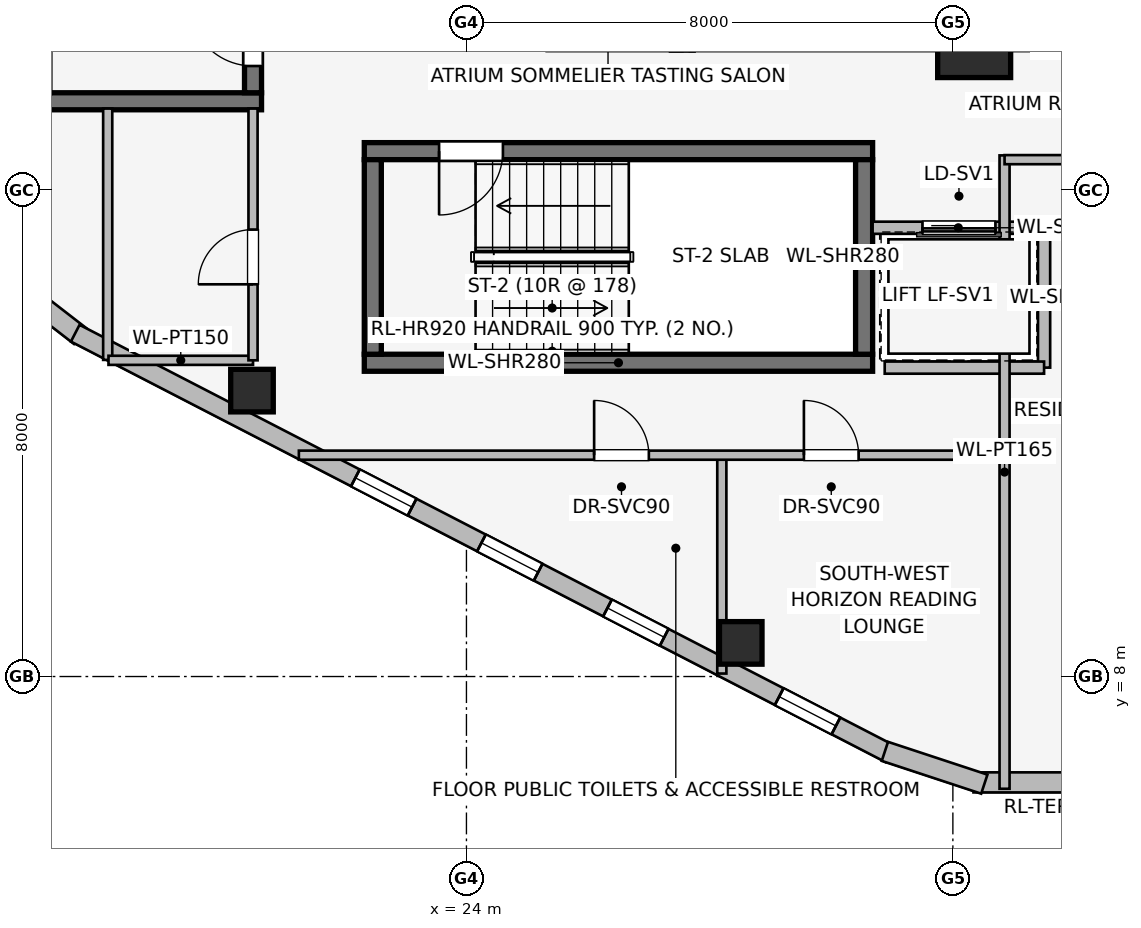
"""IFC4 building model, lengths in metres.
Left out: names, types, materials, properties, quantities, classifications, styles, units other than length and angle.
Written with IfcOpenShell. Run it as: python <this file> out.ifc"""

import sys

from ifc_helpers import new_model, si_unit, direction, frame, frame_2d, origin, origin_2d, place, context, subcontext, project, spatial, rectangle, extrude, element, fill, save


model = new_model("IFC4")
c1 = context("Model", 3, precision=1e-05, world=origin(), true_north=direction((0.0, 1.0)))
c2 = subcontext(c1, "Body", "Model", "MODEL_VIEW")
j1 = project(units=[si_unit("LENGTHUNIT", "METRE"), si_unit("PLANEANGLEUNIT", "RADIAN")], contexts=[c1])
p1 = place(None, origin())
s1 = spatial("IfcSite", under=j1, at=p1, CompositionType="ELEMENT")
p2 = place(p1, origin())
s2 = spatial("IfcBuilding", under=s1, at=p2, CompositionType="ELEMENT")
p3 = place(p2, frame((0.0, 0.0, 234.8)))
s3 = spatial("IfcBuildingStorey", under=s2, at=p3, CompositionType="ELEMENT", Elevation=234.8)
p4 = place(p3, frame((16.87, 17.46, 0.0), z_axis=(0.0, 0.0, 1.0), x_axis=(1.0, 0.0, 0.0)))
e1 = element("IfcWall", 1, at=p4, inside=s3, PredefinedType="SHEAR", context=c2, shape_type="SweptSolid", body=[
    extrude(rectangle(XDim=3.76, YDim=0.28, at=frame_2d((1.88, 0.0))), origin(), (0.0, 0.0, 1.0), 3.55),
])
p5 = place(p3, frame((20.49, 17.6, 0.0), z_axis=(0.0, 0.0, 1.0), x_axis=(0.0, 1.0, 0.0)))
e2 = element("IfcWall", 2, at=p5, inside=s3, PredefinedType="SHEAR", context=c2, shape_type="SweptSolid", body=[
    extrude(rectangle(XDim=7.8, YDim=0.28, at=frame_2d((3.9, 0.0))), origin(), (0.0, 0.0, 1.0), 3.55),
])
p6 = place(p5, frame((0.44, 0.0, 0.0)))
e3 = element("IfcOpeningElement", 3, at=p6, cuts=e2, PredefinedType="OPENING", context=c2, shape_type="SweptSolid", body=[
    extrude(rectangle(XDim=1.05, YDim=2.0, at=frame_2d((0.525, 1.0))), frame((0.0, 0.15, 0.0), z_axis=(0.0, -1.0, 0.0), x_axis=(1.0, 0.0, 0.0)), (0.0, 0.0, 1.0), 0.3),
])
p7 = place(p3, frame((22.32, 13.16, 0.0), z_axis=(0.0, 0.0, 1.0), x_axis=(1.0, 0.0, 0.0)))
e4 = element("IfcWall", 4, at=p7, inside=s3, PredefinedType="SHEAR", context=c2, shape_type="SweptSolid", body=[
    extrude(rectangle(XDim=8.36, YDim=0.28, at=frame_2d((4.18, 0.0))), origin(), (0.0, 0.0, 1.0), 3.55),
])
p8 = place(p3, frame((30.68, 16.64, 0.0), z_axis=(0.0, 0.0, 1.0), x_axis=(-1.0, 0.0, 0.0)))
e5 = element("IfcWall", 5, at=p8, inside=s3, PredefinedType="SHEAR", context=c2, shape_type="SweptSolid", body=[
    extrude(rectangle(XDim=8.36, YDim=0.28, at=frame_2d((4.18, 0.0))), origin(), (0.0, 0.0, 1.0), 3.55),
])
p9 = place(p8, frame((6.08, 0.0, 0.0)))
e6 = element("IfcOpeningElement", 6, at=p9, cuts=e5, PredefinedType="OPENING", context=c2, shape_type="SweptSolid", body=[
    extrude(rectangle(XDim=1.05, YDim=2.0, at=frame_2d((0.525, 1.0))), frame((0.0, 0.15, 0.0), z_axis=(0.0, -1.0, 0.0), x_axis=(1.0, 0.0, 0.0)), (0.0, 0.0, 1.0), 0.3),
])
for number, where, z_axis, x_axis in (
    (7, (22.46, 16.5, 0.0), (0.0, 0.0, 1.0), (0.0, -1.0, 0.0)),
    (8, (30.54, 13.3, 0.0), (0.0, 0.0, 1.0), (0.0, 1.0, 0.0)),
):
    element("IfcWall", number, at=place(p3, frame(where, z_axis=z_axis, x_axis=x_axis)), inside=s3, PredefinedType="SHEAR", context=c2, shape_type="SweptSolid", body=[
        extrude(rectangle(XDim=3.2, YDim=0.28, at=frame_2d((1.6, 0.0))), origin(), (0.0, 0.0, 1.0), 3.55),
    ])
p10 = place(p3, frame((32.35, 18.45, 0.0), z_axis=(0.0, 0.0, 1.0), x_axis=(1.0, 0.0, 0.0)))
e9 = element("IfcColumn", 9, at=p10, inside=s3, PredefinedType="COLUMN", context=c2, shape_type="SweptSolid", body=[
    extrude(rectangle(XDim=1.2, YDim=1.2, at=origin_2d()), origin(), (0.0, 0.0, 1.0), 3.55),
])
for number, where, z_axis, x_axis in (
    (10, (20.473, 12.702, 0.0), (0.0, 0.0, 1.0), (1.0, 0.0, 0.0)),
    (11, (28.511, 8.553, 0.0), (0.0, 0.0, 1.0), (1.0, 0.0, 0.0)),
):
    element("IfcColumn", number, at=place(p3, frame(where, z_axis=z_axis, x_axis=x_axis)), inside=s3, PredefinedType="COLUMN", context=c2, shape_type="SweptSolid", body=[
        extrude(rectangle(XDim=0.7, YDim=0.7, at=origin_2d()), origin(), (0.0, 0.0, 1.0), 3.55),
    ])
p11 = place(p3, frame((17.647, 13.599, 0.0), z_axis=(0.0, 0.0, 1.0), x_axis=(-0.790691856293, 0.61221433207, 0.0)))
e12 = element("IfcWall", 12, at=p11, inside=s3, PredefinedType="STANDARD", context=c2, shape_type="SweptSolid", body=[
    extrude(rectangle(XDim=1.676, YDim=0.33, at=frame_2d((0.838, 0.0))), origin(), (0.0, 0.0, 1.0), 3.26),
])
p12 = place(p3, frame((30.963, 6.73, 0.0), z_axis=(0.0, 0.0, 1.0), x_axis=(-0.888581481622, 0.458718814218, 0.0)))
e13 = element("IfcWall", 13, at=p12, inside=s3, PredefinedType="STANDARD", context=c2, shape_type="SweptSolid", body=[
    extrude(rectangle(XDim=15.077, YDim=0.31, at=frame_2d((7.539, 0.0))), origin(), (0.0, 0.0, 1.0), 3.26),
])
p13 = place(p12, frame((0.998, 0.0, 0.75)))
e14 = element("IfcOpeningElement", 14, at=p13, cuts=e13, PredefinedType="OPENING", context=c2, shape_type="SweptSolid", body=[
    extrude(rectangle(XDim=1.05, YDim=1.4, at=frame_2d((0.525, 0.7))), frame((0.0, 0.165, 0.0), z_axis=(0.0, -1.0, 0.0), x_axis=(1.0, 0.0, 0.0)), (0.0, 0.0, 1.0), 0.33),
])
p14 = place(p12, frame((4.176, 0.0, 0.75)))
e15 = element("IfcOpeningElement", 15, at=p14, cuts=e13, PredefinedType="OPENING", context=c2, shape_type="SweptSolid", body=[
    extrude(rectangle(XDim=1.05, YDim=1.4, at=frame_2d((0.525, 0.7))), frame((0.0, 0.165, 0.0), z_axis=(0.0, -1.0, 0.0), x_axis=(1.0, 0.0, 0.0)), (0.0, 0.0, 1.0), 0.33),
])
p15 = place(p12, frame((6.509, 0.0, 0.75)))
e16 = element("IfcOpeningElement", 16, at=p15, cuts=e13, PredefinedType="OPENING", context=c2, shape_type="SweptSolid", body=[
    extrude(rectangle(XDim=1.05, YDim=1.4, at=frame_2d((0.525, 0.7))), frame((0.0, 0.165, 0.0), z_axis=(0.0, -1.0, 0.0), x_axis=(1.0, 0.0, 0.0)), (0.0, 0.0, 1.0), 0.33),
])
p16 = place(p12, frame((8.842, 0.0, 0.75)))
e17 = element("IfcOpeningElement", 17, at=p16, cuts=e13, PredefinedType="OPENING", context=c2, shape_type="SweptSolid", body=[
    extrude(rectangle(XDim=1.05, YDim=1.4, at=frame_2d((0.525, 0.7))), frame((0.0, 0.165, 0.0), z_axis=(0.0, -1.0, 0.0), x_axis=(1.0, 0.0, 0.0)), (0.0, 0.0, 1.0), 0.33),
])
p17 = place(p3, frame((34.061, 6.259, 0.0), z_axis=(0.0, 0.0, 1.0), x_axis=(-1.0, 0.0, 0.0)))
e18 = element("IfcWall", 18, at=p17, inside=s3, PredefinedType="STANDARD", context=c2, shape_type="SweptSolid", body=[
    extrude(rectangle(XDim=1.722, YDim=0.33, at=frame_2d((0.861, 0.0))), origin(), (0.0, 0.0, 1.0), 3.26),
])
p18 = place(p3, frame((32.517, 6.23, 0.0), z_axis=(0.0, 0.0, 1.0), x_axis=(-0.949713440491, 0.313120393699, 0.0)))
e19 = element("IfcWall", 19, at=p18, inside=s3, PredefinedType="STANDARD", context=c2, shape_type="SweptSolid", body=[
    extrude(rectangle(XDim=1.722, YDim=0.33, at=frame_2d((0.861, 0.0))), origin(), (0.0, 0.0, 1.0), 3.26),
])
p19 = place(p3, frame((33.5, 15.38, 0.0), z_axis=(0.0, 0.0, 1.0), x_axis=(-1.0, 0.0, 0.0)))
e20 = element("IfcWall", 20, at=p19, inside=s3, PredefinedType="PARTITIONING", context=c2, shape_type="SweptSolid", body=[
    extrude(rectangle(XDim=2.82, YDim=0.2, at=frame_2d((1.41, 0.0))), origin(), (0.0, 0.0, 1.0), 3.26),
])
p20 = place(p19, frame((0.8, 0.0, 0.0)))
e21 = element("IfcOpeningElement", 21, at=p20, cuts=e20, PredefinedType="OPENING", context=c2, shape_type="SweptSolid", body=[
    extrude(rectangle(XDim=1.2, YDim=2.2, at=frame_2d((0.6, 1.1))), frame((0.0, 0.11, 0.0), z_axis=(0.0, -1.0, 0.0), x_axis=(1.0, 0.0, 0.0)), (0.0, 0.0, 1.0), 0.22),
])
p21 = place(p3, frame((33.5, 13.08, 0.0), z_axis=(0.0, 0.0, 1.0), x_axis=(0.0, 1.0, 0.0)))
e22 = element("IfcWall", 22, at=p21, inside=s3, PredefinedType="PARTITIONING", context=c2, shape_type="SweptSolid", body=[
    extrude(rectangle(XDim=2.3, YDim=0.2, at=frame_2d((1.15, 0.0))), origin(), (0.0, 0.0, 1.0), 3.26),
])
p22 = place(p3, frame((30.879, 13.08, 0.0), z_axis=(0.0, 0.0, 1.0), x_axis=(1.0, 0.0, 0.0)))
e23 = element("IfcWall", 23, at=p22, inside=s3, PredefinedType="PARTITIONING", context=c2, shape_type="SweptSolid", body=[
    extrude(rectangle(XDim=2.621, YDim=0.2, at=frame_2d((1.311, 0.0))), origin(), (0.0, 0.0, 1.0), 3.26),
])
p23 = place(p3, frame((18.1, 17.34, 0.0), z_axis=(0.0, 0.0, 1.0), x_axis=(0.0, -1.0, 0.0)))
e24 = element("IfcWall", 24, at=p23, inside=s3, PredefinedType="PARTITIONING", context=c2, shape_type="SweptSolid", body=[
    extrude(rectangle(XDim=4.133, YDim=0.15, at=frame_2d((2.066, 0.0))), origin(), (0.0, 0.0, 1.0), 3.26),
])
p24 = place(p3, frame((18.113, 13.2, 0.0), z_axis=(0.0, 0.0, 1.0), x_axis=(1.0, 0.0, 0.0)))
e25 = element("IfcWall", 25, at=p24, inside=s3, PredefinedType="PARTITIONING", context=c2, shape_type="SweptSolid", body=[
    extrude(rectangle(XDim=2.377, YDim=0.15, at=frame_2d((1.188, 0.0))), origin(), (0.0, 0.0, 1.0), 3.26),
])
p25 = place(p3, frame((20.49, 13.2, 0.0), z_axis=(0.0, 0.0, 1.0), x_axis=(0.0, 1.0, 0.0)))
e26 = element("IfcWall", 26, at=p25, inside=s3, PredefinedType="PARTITIONING", context=c2, shape_type="SweptSolid", body=[
    extrude(rectangle(XDim=4.14, YDim=0.15, at=frame_2d((2.07, 0.0))), origin(), (0.0, 0.0, 1.0), 3.26),
])
p26 = place(p25, frame((1.25, 0.0, 0.0)))
e27 = element("IfcOpeningElement", 27, at=p26, cuts=e26, PredefinedType="OPENING", context=c2, shape_type="SweptSolid", body=[
    extrude(rectangle(XDim=0.9, YDim=2.0, at=frame_2d((0.45, 1.0))), frame((0.0, 0.085, 0.0), z_axis=(0.0, -1.0, 0.0), x_axis=(1.0, 0.0, 0.0)), (0.0, 0.0, 1.0), 0.17),
])
p27 = place(p3, frame((32.85, 6.154, 0.0), z_axis=(0.0, 0.0, 1.0), x_axis=(0.0, 1.0, 0.0)))
e28 = element("IfcWall", 28, at=p27, inside=s3, PredefinedType="PARTITIONING", context=c2, shape_type="SweptSolid", body=[
    extrude(rectangle(XDim=10.416, YDim=0.165, at=frame_2d((5.208, 0.0))), origin(), (0.0, 0.0, 1.0), 3.26),
])
p28 = place(p3, frame((28.2, 8.049, 0.0), z_axis=(0.0, 0.0, 1.0), x_axis=(0.0, 1.0, 0.0)))
e29 = element("IfcWall", 29, at=p28, inside=s3, PredefinedType="PARTITIONING", context=c2, shape_type="SweptSolid", body=[
    extrude(rectangle(XDim=3.591, YDim=0.15, at=frame_2d((1.795, 0.0))), origin(), (0.0, 0.0, 1.0), 3.26),
])
p29 = place(p3, frame((21.244, 11.64, 0.0), z_axis=(0.0, 0.0, 1.0), x_axis=(1.0, 0.0, 0.0)))
e30 = element("IfcWall", 30, at=p29, inside=s3, PredefinedType="PARTITIONING", context=c2, shape_type="SweptSolid", body=[
    extrude(rectangle(XDim=11.606, YDim=0.15, at=frame_2d((5.803, 0.0))), origin(), (0.0, 0.0, 1.0), 3.26),
])
p30 = place(p29, frame((4.856, 0.0, 0.0)))
e31 = element("IfcOpeningElement", 31, at=p30, cuts=e30, PredefinedType="OPENING", context=c2, shape_type="SweptSolid", body=[
    extrude(rectangle(XDim=0.9, YDim=2.0, at=frame_2d((0.45, 1.0))), frame((0.0, 0.085, 0.0), z_axis=(0.0, -1.0, 0.0), x_axis=(1.0, 0.0, 0.0)), (0.0, 0.0, 1.0), 0.17),
])
p31 = place(p29, frame((8.306, 0.0, 0.0)))
e32 = element("IfcOpeningElement", 32, at=p31, cuts=e30, PredefinedType="OPENING", context=c2, shape_type="SweptSolid", body=[
    extrude(rectangle(XDim=0.9, YDim=2.0, at=frame_2d((0.45, 1.0))), frame((0.0, 0.085, 0.0), z_axis=(0.0, -1.0, 0.0), x_axis=(1.0, 0.0, 0.0)), (0.0, 0.0, 1.0), 0.17),
])
p32 = place(p3, frame((32.85, 16.5, 0.0), z_axis=(0.0, 0.0, 1.0), x_axis=(1.0, 0.0, 0.0)))
e33 = element("IfcWall", 33, at=p32, inside=s3, PredefinedType="PARTITIONING", context=c2, shape_type="SweptSolid", body=[
    extrude(rectangle(XDim=8.61, YDim=0.15, at=frame_2d((4.305, 0.0))), origin(), (0.0, 0.0, 1.0), 3.26),
])
p33 = place(p32, frame((3.825, 0.0, 0.0)))
e34 = element("IfcOpeningElement", 34, at=p33, cuts=e33, PredefinedType="OPENING", context=c2, shape_type="SweptSolid", body=[
    extrude(rectangle(XDim=0.96, YDim=2.0, at=frame_2d((0.48, 1.0))), frame((0.0, 0.085, 0.0), z_axis=(0.0, -1.0, 0.0), x_axis=(1.0, 0.0, 0.0)), (0.0, 0.0, 1.0), 0.17),
])
p34 = place(p13, origin())
e35 = element("IfcWindow", 35, at=p34, inside=s3, PartitioningType="SINGLE_PANEL", PredefinedType="WINDOW", context=c2, shape_type="SweptSolid", body=[
    extrude(rectangle(XDim=1.05, YDim=1.4, at=frame_2d((0.525, 0.7))), frame((0.0, 0.03, 0.0), z_axis=(0.0, -1.0, 0.0), x_axis=(1.0, 0.0, 0.0)), (0.0, 0.0, 1.0), 0.06),
])
fill(e14, e35)
p35 = place(p14, origin())
e36 = element("IfcWindow", 36, at=p35, inside=s3, PartitioningType="SINGLE_PANEL", PredefinedType="WINDOW", context=c2, shape_type="SweptSolid", body=[
    extrude(rectangle(XDim=1.05, YDim=1.4, at=frame_2d((0.525, 0.7))), frame((0.0, 0.03, 0.0), z_axis=(0.0, -1.0, 0.0), x_axis=(1.0, 0.0, 0.0)), (0.0, 0.0, 1.0), 0.06),
])
fill(e15, e36)
p36 = place(p15, origin())
e37 = element("IfcWindow", 37, at=p36, inside=s3, PartitioningType="SINGLE_PANEL", PredefinedType="WINDOW", context=c2, shape_type="SweptSolid", body=[
    extrude(rectangle(XDim=1.05, YDim=1.4, at=frame_2d((0.525, 0.7))), frame((0.0, 0.03, 0.0), z_axis=(0.0, -1.0, 0.0), x_axis=(1.0, 0.0, 0.0)), (0.0, 0.0, 1.0), 0.06),
])
fill(e16, e37)
p37 = place(p16, origin())
e38 = element("IfcWindow", 38, at=p37, inside=s3, PartitioningType="SINGLE_PANEL", PredefinedType="WINDOW", context=c2, shape_type="SweptSolid", body=[
    extrude(rectangle(XDim=1.05, YDim=1.4, at=frame_2d((0.525, 0.7))), frame((0.0, 0.03, 0.0), z_axis=(0.0, -1.0, 0.0), x_axis=(1.0, 0.0, 0.0)), (0.0, 0.0, 1.0), 0.06),
])
fill(e17, e38)
p38 = place(p6, origin())
e39 = element("IfcDoor", 39, at=p38, inside=s3, OperationType="SINGLE_SWING_RIGHT", PredefinedType="DOOR", context=c2, shape_type="SweptSolid", body=[
    extrude(rectangle(XDim=1.05, YDim=2.0, at=frame_2d((0.525, 1.0))), frame((0.0, 0.025, 0.0), z_axis=(0.0, -1.0, 0.0), x_axis=(1.0, 0.0, 0.0)), (0.0, 0.0, 1.0), 0.05),
])
fill(e3, e39)
p39 = place(p9, origin())
e40 = element("IfcDoor", 40, at=p39, inside=s3, OperationType="SINGLE_SWING_RIGHT", PredefinedType="DOOR", context=c2, shape_type="SweptSolid", body=[
    extrude(rectangle(XDim=1.05, YDim=2.0, at=frame_2d((0.525, 1.0))), frame((0.0, 0.025, 0.0), z_axis=(0.0, -1.0, 0.0), x_axis=(1.0, 0.0, 0.0)), (0.0, 0.0, 1.0), 0.05),
])
fill(e6, e40)
p40 = place(p20, origin())
e41 = element("IfcDoor", 41, at=p40, inside=s3, OperationType="SLIDING_TO_RIGHT", PredefinedType="DOOR", context=c2, shape_type="SweptSolid", body=[
    extrude(rectangle(XDim=1.2, YDim=2.2, at=frame_2d((0.6, 1.1))), frame((0.0, 0.025, 0.0), z_axis=(0.0, -1.0, 0.0), x_axis=(1.0, 0.0, 0.0)), (0.0, 0.0, 1.0), 0.05),
])
fill(e21, e41)
p41 = place(p26, origin())
e42 = element("IfcDoor", 42, at=p41, inside=s3, OperationType="SINGLE_SWING_LEFT", PredefinedType="DOOR", context=c2, shape_type="SweptSolid", body=[
    extrude(rectangle(XDim=0.9, YDim=2.0, at=frame_2d((0.45, 1.0))), frame((0.0, 0.025, 0.0), z_axis=(0.0, -1.0, 0.0), x_axis=(1.0, 0.0, 0.0)), (0.0, 0.0, 1.0), 0.05),
])
fill(e27, e42)
p42 = place(p30, origin())
e43 = element("IfcDoor", 43, at=p42, inside=s3, OperationType="SINGLE_SWING_LEFT", PredefinedType="DOOR", context=c2, shape_type="SweptSolid", body=[
    extrude(rectangle(XDim=0.9, YDim=2.0, at=frame_2d((0.45, 1.0))), frame((0.0, 0.025, 0.0), z_axis=(0.0, -1.0, 0.0), x_axis=(1.0, 0.0, 0.0)), (0.0, 0.0, 1.0), 0.05),
])
fill(e31, e43)
p43 = place(p31, origin())
e44 = element("IfcDoor", 44, at=p43, inside=s3, OperationType="SINGLE_SWING_LEFT", PredefinedType="DOOR", context=c2, shape_type="SweptSolid", body=[
    extrude(rectangle(XDim=0.9, YDim=2.0, at=frame_2d((0.45, 1.0))), frame((0.0, 0.025, 0.0), z_axis=(0.0, -1.0, 0.0), x_axis=(1.0, 0.0, 0.0)), (0.0, 0.0, 1.0), 0.05),
])
fill(e32, e44)
save(model, sys.argv[1])
